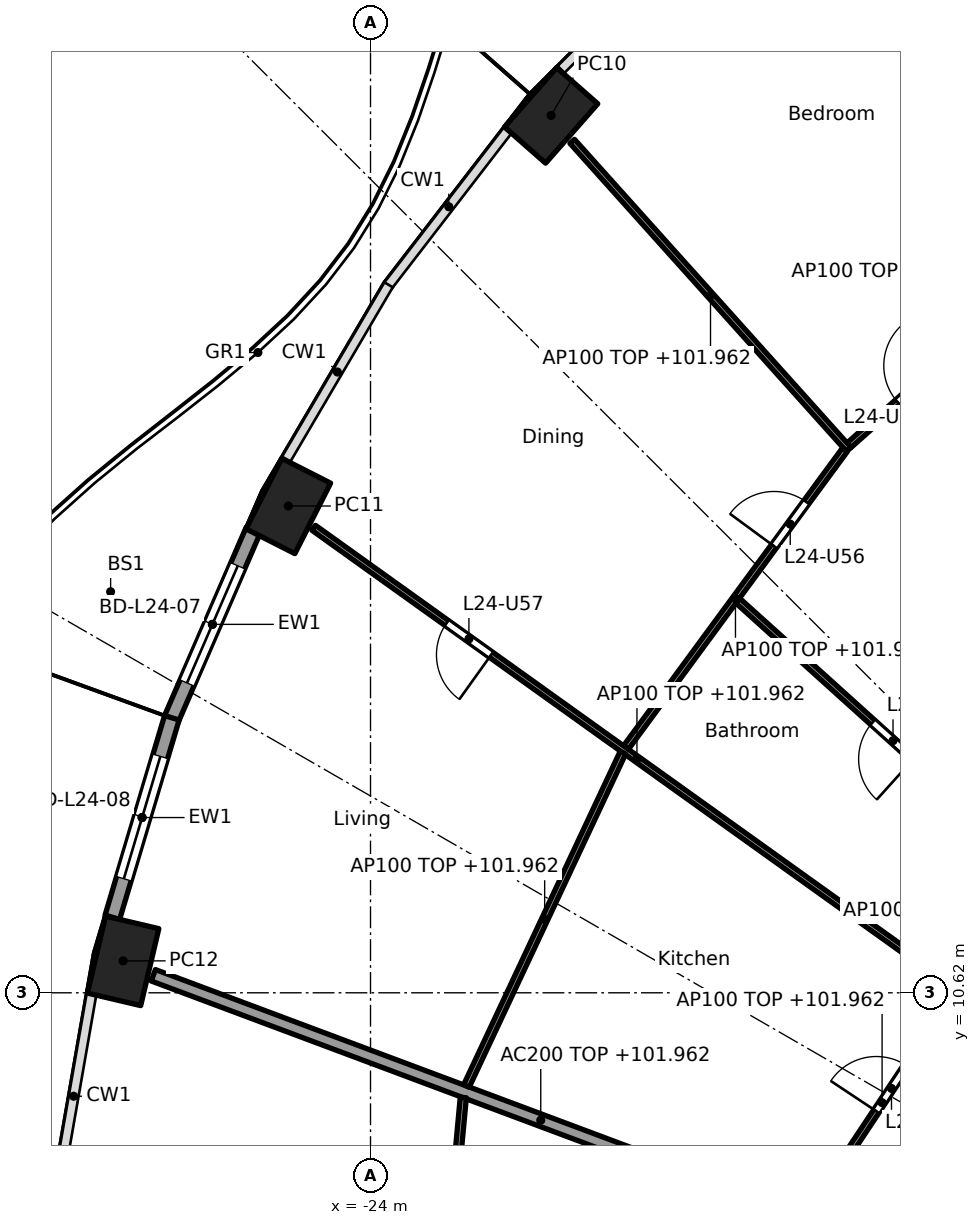
"""IFC4 building model, lengths in metres.
Left out: names, types, materials, properties, quantities, classifications, styles, units other than length and angle.
Written with IfcOpenShell. Run it as: python <this file> out.ifc"""

import sys

from ifc_helpers import new_model, si_unit, direction, frame, frame_2d, origin, origin_2d, place, context, subcontext, project, spatial, rectangle, hollow_rectangle, extrude, element, fill, save


model = new_model("IFC4")
c1 = context("Model", 3, precision=1e-05, world=origin(), true_north=direction((0.0, 1.0)))
c2 = subcontext(c1, "Body", "Model", "MODEL_VIEW")
j1 = project(units=[si_unit("LENGTHUNIT", "METRE"), si_unit("PLANEANGLEUNIT", "RADIAN")], contexts=[c1])
p1 = place(None, origin())
s1 = spatial("IfcSite", under=j1, at=p1, CompositionType="ELEMENT")
p2 = place(p1, origin())
s2 = spatial("IfcBuilding", under=s1, at=p2, CompositionType="ELEMENT")
p3 = place(p2, frame((0.0, 0.0, 99.2)))
s3 = spatial("IfcBuildingStorey", under=s2, at=p3, CompositionType="ELEMENT", Elevation=99.2)
for number, where, z_axis, x_axis in (
    (1, (-21.03, 25.049, 0.0), (0.0, 0.0, 1.0), (-0.66, -0.751, 0.0)),
    (2, (-25.352, 18.625, 0.0), (0.0, 0.0, 1.0), (-0.452, -0.892, 0.0)),
    (3, (-28.068, 11.145, 0.0), (0.0, 0.0, 1.0), (-0.229, -0.973, 0.0)),
):
    element("IfcColumn", number, at=place(p3, frame(where, z_axis=z_axis, x_axis=x_axis)), inside=s3, PredefinedType="COLUMN", context=c2, shape_type="SweptSolid", body=[
        extrude(hollow_rectangle(XDim=1.3, YDim=0.9, WallThickness=0.045, at=origin_2d()), origin(), (0.0, 0.0, 1.0), 3.7),
    ])
p4 = place(p3, frame((-27.272, 15.128, 0.0), z_axis=(0.0, 0.0, 1.0), x_axis=(0.397682447205, 0.917523117521, 0.0)))
e4 = element("IfcWall", 4, at=p4, inside=s3, PredefinedType="SOLIDWALL", context=c2, shape_type="SweptSolid", body=[
    extrude(rectangle(XDim=3.38, YDim=0.25, at=frame_2d((1.69, 0.0))), origin(), (0.0, 0.0, 1.0), 3.44),
])
p5 = place(p4, frame((0.64, 0.0, 0.0)))
e5 = element("IfcOpeningElement", 5, at=p5, cuts=e4, PredefinedType="OPENING", context=c2, shape_type="SweptSolid", body=[
    extrude(rectangle(XDim=2.1, YDim=2.4, at=frame_2d((1.05, 1.2))), frame((0.0, 0.135, 0.0), z_axis=(0.0, -1.0, 0.0), x_axis=(1.0, 0.0, 0.0)), (0.0, 0.0, 1.0), 0.27),
])
p6 = place(p3, frame((-28.246, 11.862, 0.0), z_axis=(0.0, 0.0, 1.0), x_axis=(0.285816610469, 0.958284334203, 0.0)))
e6 = element("IfcWall", 6, at=p6, inside=s3, PredefinedType="SOLIDWALL", context=c2, shape_type="SweptSolid", body=[
    extrude(rectangle(XDim=3.424, YDim=0.25, at=frame_2d((1.712, 0.0))), origin(), (0.0, 0.0, 1.0), 3.44),
])
p7 = place(p6, frame((0.662, 0.0, 0.0)))
e7 = element("IfcOpeningElement", 7, at=p7, cuts=e6, PredefinedType="OPENING", context=c2, shape_type="SweptSolid", body=[
    extrude(rectangle(XDim=2.1, YDim=2.4, at=frame_2d((1.05, 1.2))), frame((0.0, 0.135, 0.0), z_axis=(0.0, -1.0, 0.0), x_axis=(1.0, 0.0, 0.0)), (0.0, 0.0, 1.0), 0.27),
])
p8 = place(p3, frame((-14.829, 6.14, 0.0), z_axis=(0.0, 0.0, 1.0), x_axis=(-0.936597324342, 0.35040755134, 0.0)))
e8 = element("IfcWall", 8, at=p8, inside=s3, PredefinedType="PARTITIONING", context=c2, shape_type="SweptSolid", body=[
    extrude(rectangle(XDim=13.606, YDim=0.2, at=frame_2d((6.803, 0.0))), origin(), (0.0, 0.0, 1.0), 2.762),
])
p9 = place(p3, frame((-11.628, 23.626, 0.0), z_axis=(0.0, 0.0, 1.0), x_axis=(-0.747429444005, -0.664341197153, 0.0)))
e9 = element("IfcWall", 9, at=p9, inside=s3, PredefinedType="PARTITIONING", context=c2, shape_type="SweptSolid", body=[
    extrude(rectangle(XDim=6.024, YDim=0.1, at=frame_2d((3.012, 0.0))), origin(), (0.0, 0.0, 1.0), 2.762),
])
p10 = place(p9, frame((4.055, 0.0, 0.0)))
e10 = element("IfcOpeningElement", 10, at=p10, cuts=e9, PredefinedType="OPENING", context=c2, shape_type="SweptSolid", body=[
    extrude(rectangle(XDim=0.9, YDim=2.1, at=frame_2d((0.45, 1.05))), frame((0.0, 0.06, 0.0), z_axis=(0.0, -1.0, 0.0), x_axis=(1.0, 0.0, 0.0)), (0.0, 0.0, 1.0), 0.12),
])
p11 = place(p9, frame((1.043, 0.0, 0.0)))
e11 = element("IfcOpeningElement", 11, at=p11, cuts=e9, PredefinedType="OPENING", context=c2, shape_type="SweptSolid", body=[
    extrude(rectangle(XDim=0.9, YDim=2.1, at=frame_2d((0.45, 1.05))), frame((0.0, 0.06, 0.0), z_axis=(0.0, -1.0, 0.0), x_axis=(1.0, 0.0, 0.0)), (0.0, 0.0, 1.0), 0.12),
])
p12 = place(p3, frame((-16.134, 19.554, 0.0), z_axis=(0.0, 0.0, 1.0), x_axis=(-0.667985610263, 0.74417418961, 0.0)))
e12 = element("IfcWall", 12, at=p12, inside=s3, PredefinedType="PARTITIONING", context=c2, shape_type="SweptSolid", body=[
    extrude(rectangle(XDim=6.809, YDim=0.1, at=frame_2d((3.405, 0.0))), origin(), (0.0, 0.0, 1.0), 2.762),
])
p13 = place(p3, frame((-16.197, 19.551, 0.0), z_axis=(0.0, 0.0, 1.0), x_axis=(-0.592391983588, -0.80564988536, 0.0)))
e13 = element("IfcWall", 13, at=p13, inside=s3, PredefinedType="PARTITIONING", context=c2, shape_type="SweptSolid", body=[
    extrude(rectangle(XDim=6.08, YDim=0.1, at=frame_2d((3.04, 0.0))), origin(), (0.0, 0.0, 1.0), 2.762),
])
p14 = place(p13, frame((1.07, 0.0, 0.0)))
e14 = element("IfcOpeningElement", 14, at=p14, cuts=e13, PredefinedType="OPENING", context=c2, shape_type="SweptSolid", body=[
    extrude(rectangle(XDim=0.9, YDim=2.1, at=frame_2d((0.45, 1.05))), frame((0.0, 0.06, 0.0), z_axis=(0.0, -1.0, 0.0), x_axis=(1.0, 0.0, 0.0)), (0.0, 0.0, 1.0), 0.12),
])
p15 = place(p3, frame((-8.959, 8.952, 0.0), z_axis=(0.0, 0.0, 1.0), x_axis=(-0.742679904999, 0.669646592398, 0.0)))
e15 = element("IfcWall", 15, at=p15, inside=s3, PredefinedType="PARTITIONING", context=c2, shape_type="SweptSolid", body=[
    extrude(rectangle(XDim=12.121, YDim=0.1, at=frame_2d((6.061, 0.0))), origin(), (0.0, 0.0, 1.0), 2.687),
])
p16 = place(p15, frame((2.172, 0.0, 0.0)))
e16 = element("IfcOpeningElement", 16, at=p16, cuts=e15, PredefinedType="OPENING", context=c2, shape_type="SweptSolid", body=[
    extrude(rectangle(XDim=0.9, YDim=2.1, at=frame_2d((0.45, 1.05))), frame((0.0, 0.06, 0.0), z_axis=(0.0, -1.0, 0.0), x_axis=(1.0, 0.0, 0.0)), (0.0, 0.0, 1.0), 0.12),
])
p17 = place(p15, frame((8.233, 0.0, 0.0)))
e17 = element("IfcOpeningElement", 17, at=p17, cuts=e15, PredefinedType="OPENING", context=c2, shape_type="SweptSolid", body=[
    extrude(rectangle(XDim=0.9, YDim=2.1, at=frame_2d((0.45, 1.05))), frame((0.0, 0.06, 0.0), z_axis=(0.0, -1.0, 0.0), x_axis=(1.0, 0.0, 0.0)), (0.0, 0.0, 1.0), 0.12),
])
p18 = place(p3, frame((-14.302, 10.657, 0.0), z_axis=(0.0, 0.0, 1.0), x_axis=(-0.813183002698, 0.582008079087, 0.0)))
e18 = element("IfcWall", 18, at=p18, inside=s3, PredefinedType="PARTITIONING", context=c2, shape_type="SweptSolid", body=[
    extrude(rectangle(XDim=13.074, YDim=0.1, at=frame_2d((6.537, 0.0))), origin(), (0.0, 0.0, 1.0), 2.762),
])
p19 = place(p18, frame((9.485, 0.0, 0.0)))
e19 = element("IfcOpeningElement", 19, at=p19, cuts=e18, PredefinedType="OPENING", context=c2, shape_type="SweptSolid", body=[
    extrude(rectangle(XDim=0.9, YDim=2.1, at=frame_2d((0.45, 1.05))), frame((0.0, 0.06, 0.0), z_axis=(0.0, -1.0, 0.0), x_axis=(1.0, 0.0, 0.0)), (0.0, 0.0, 1.0), 0.12),
])
p20 = place(p3, frame((-14.371, 10.645, 0.0), z_axis=(0.0, 0.0, 1.0), x_axis=(-0.553341009285, -0.832954817168, 0.0)))
e20 = element("IfcWall", 20, at=p20, inside=s3, PredefinedType="PARTITIONING", context=c2, shape_type="SweptSolid", body=[
    extrude(rectangle(XDim=4.396, YDim=0.1, at=frame_2d((2.198, 0.0))), origin(), (0.0, 0.0, 1.0), 2.762),
])
p21 = place(p20, frame((1.469, 0.0, 0.0)))
e21 = element("IfcOpeningElement", 21, at=p21, cuts=e20, PredefinedType="OPENING", context=c2, shape_type="SweptSolid", body=[
    extrude(rectangle(XDim=0.9, YDim=2.1, at=frame_2d((0.45, 1.05))), frame((0.0, 0.06, 0.0), z_axis=(0.0, -1.0, 0.0), x_axis=(1.0, 0.0, 0.0)), (0.0, 0.0, 1.0), 0.12),
])
p22 = place(p3, frame((-19.85, 14.567, 0.0), z_axis=(0.0, 0.0, 1.0), x_axis=(-0.424942210745, -0.905220480064, 0.0)))
e22 = element("IfcWall", 22, at=p22, inside=s3, PredefinedType="PARTITIONING", context=c2, shape_type="SweptSolid", body=[
    extrude(rectangle(XDim=6.053, YDim=0.1, at=frame_2d((3.027, 0.0))), origin(), (0.0, 0.0, 1.0), 2.762),
])
p23 = place(p3, frame((-22.474, 8.898, 0.0), z_axis=(0.0, 0.0, 1.0), x_axis=(-0.092756864489, -0.995688788774, 0.0)))
e23 = element("IfcWall", 23, at=p23, inside=s3, PredefinedType="PARTITIONING", context=c2, shape_type="SweptSolid", body=[
    extrude(rectangle(XDim=6.283, YDim=0.1, at=frame_2d((3.141, 0.0))), origin(), (0.0, 0.0, 1.0), 2.762),
])
p24 = place(p5, origin())
e24 = element("IfcDoor", 24, at=p24, inside=s3, OperationType="SLIDING_TO_LEFT", PredefinedType="DOOR", context=c2, shape_type="SweptSolid", body=[
    extrude(rectangle(XDim=2.1, YDim=2.4, at=frame_2d((1.05, 1.2))), frame((0.0, 0.025, 0.0), z_axis=(0.0, -1.0, 0.0), x_axis=(1.0, 0.0, 0.0)), (0.0, 0.0, 1.0), 0.05),
])
fill(e5, e24)
p25 = place(p7, origin())
e25 = element("IfcDoor", 25, at=p25, inside=s3, OperationType="SLIDING_TO_LEFT", PredefinedType="DOOR", context=c2, shape_type="SweptSolid", body=[
    extrude(rectangle(XDim=2.1, YDim=2.4, at=frame_2d((1.05, 1.2))), frame((0.0, 0.025, 0.0), z_axis=(0.0, -1.0, 0.0), x_axis=(1.0, 0.0, 0.0)), (0.0, 0.0, 1.0), 0.05),
])
fill(e7, e25)
p26 = place(p17, origin())
e26 = element("IfcDoor", 26, at=p26, inside=s3, OperationType="SINGLE_SWING_LEFT", PredefinedType="DOOR", context=c2, shape_type="SweptSolid", body=[
    extrude(rectangle(XDim=0.9, YDim=2.1, at=frame_2d((0.45, 1.05))), frame((0.0, 0.025, 0.0), z_axis=(0.0, -1.0, 0.0), x_axis=(1.0, 0.0, 0.0)), (0.0, 0.0, 1.0), 0.05),
])
fill(e17, e26)
p27 = place(p21, frame((0.9, 0.0, 0.0), x_axis=(-1.0, 0.0, 0.0)))
e27 = element("IfcDoor", 27, at=p27, inside=s3, OperationType="SINGLE_SWING_LEFT", PredefinedType="DOOR", context=c2, shape_type="SweptSolid", body=[
    extrude(rectangle(XDim=0.9, YDim=2.1, at=frame_2d((0.45, 1.05))), frame((0.0, 0.025, 0.0), z_axis=(0.0, -1.0, 0.0), x_axis=(1.0, 0.0, 0.0)), (0.0, 0.0, 1.0), 0.05),
])
fill(e21, e27)
p28 = place(p10, frame((0.9, 0.0, 0.0), x_axis=(-1.0, 0.0, 0.0)))
e28 = element("IfcDoor", 28, at=p28, inside=s3, OperationType="SINGLE_SWING_RIGHT", PredefinedType="DOOR", context=c2, shape_type="SweptSolid", body=[
    extrude(rectangle(XDim=0.9, YDim=2.1, at=frame_2d((0.45, 1.05))), frame((0.0, 0.025, 0.0), z_axis=(0.0, -1.0, 0.0), x_axis=(1.0, 0.0, 0.0)), (0.0, 0.0, 1.0), 0.05),
])
fill(e10, e28)
p29 = place(p14, frame((0.9, 0.0, 0.0), x_axis=(-1.0, 0.0, 0.0)))
e29 = element("IfcDoor", 29, at=p29, inside=s3, OperationType="SINGLE_SWING_LEFT", PredefinedType="DOOR", context=c2, shape_type="SweptSolid", body=[
    extrude(rectangle(XDim=0.9, YDim=2.1, at=frame_2d((0.45, 1.05))), frame((0.0, 0.025, 0.0), z_axis=(0.0, -1.0, 0.0), x_axis=(1.0, 0.0, 0.0)), (0.0, 0.0, 1.0), 0.05),
])
fill(e14, e29)
p30 = place(p19, origin())
e30 = element("IfcDoor", 30, at=p30, inside=s3, OperationType="SINGLE_SWING_LEFT", PredefinedType="DOOR", context=c2, shape_type="SweptSolid", body=[
    extrude(rectangle(XDim=0.9, YDim=2.1, at=frame_2d((0.45, 1.05))), frame((0.0, 0.025, 0.0), z_axis=(0.0, -1.0, 0.0), x_axis=(1.0, 0.0, 0.0)), (0.0, 0.0, 1.0), 0.05),
])
fill(e19, e30)
save(model, sys.argv[1])
